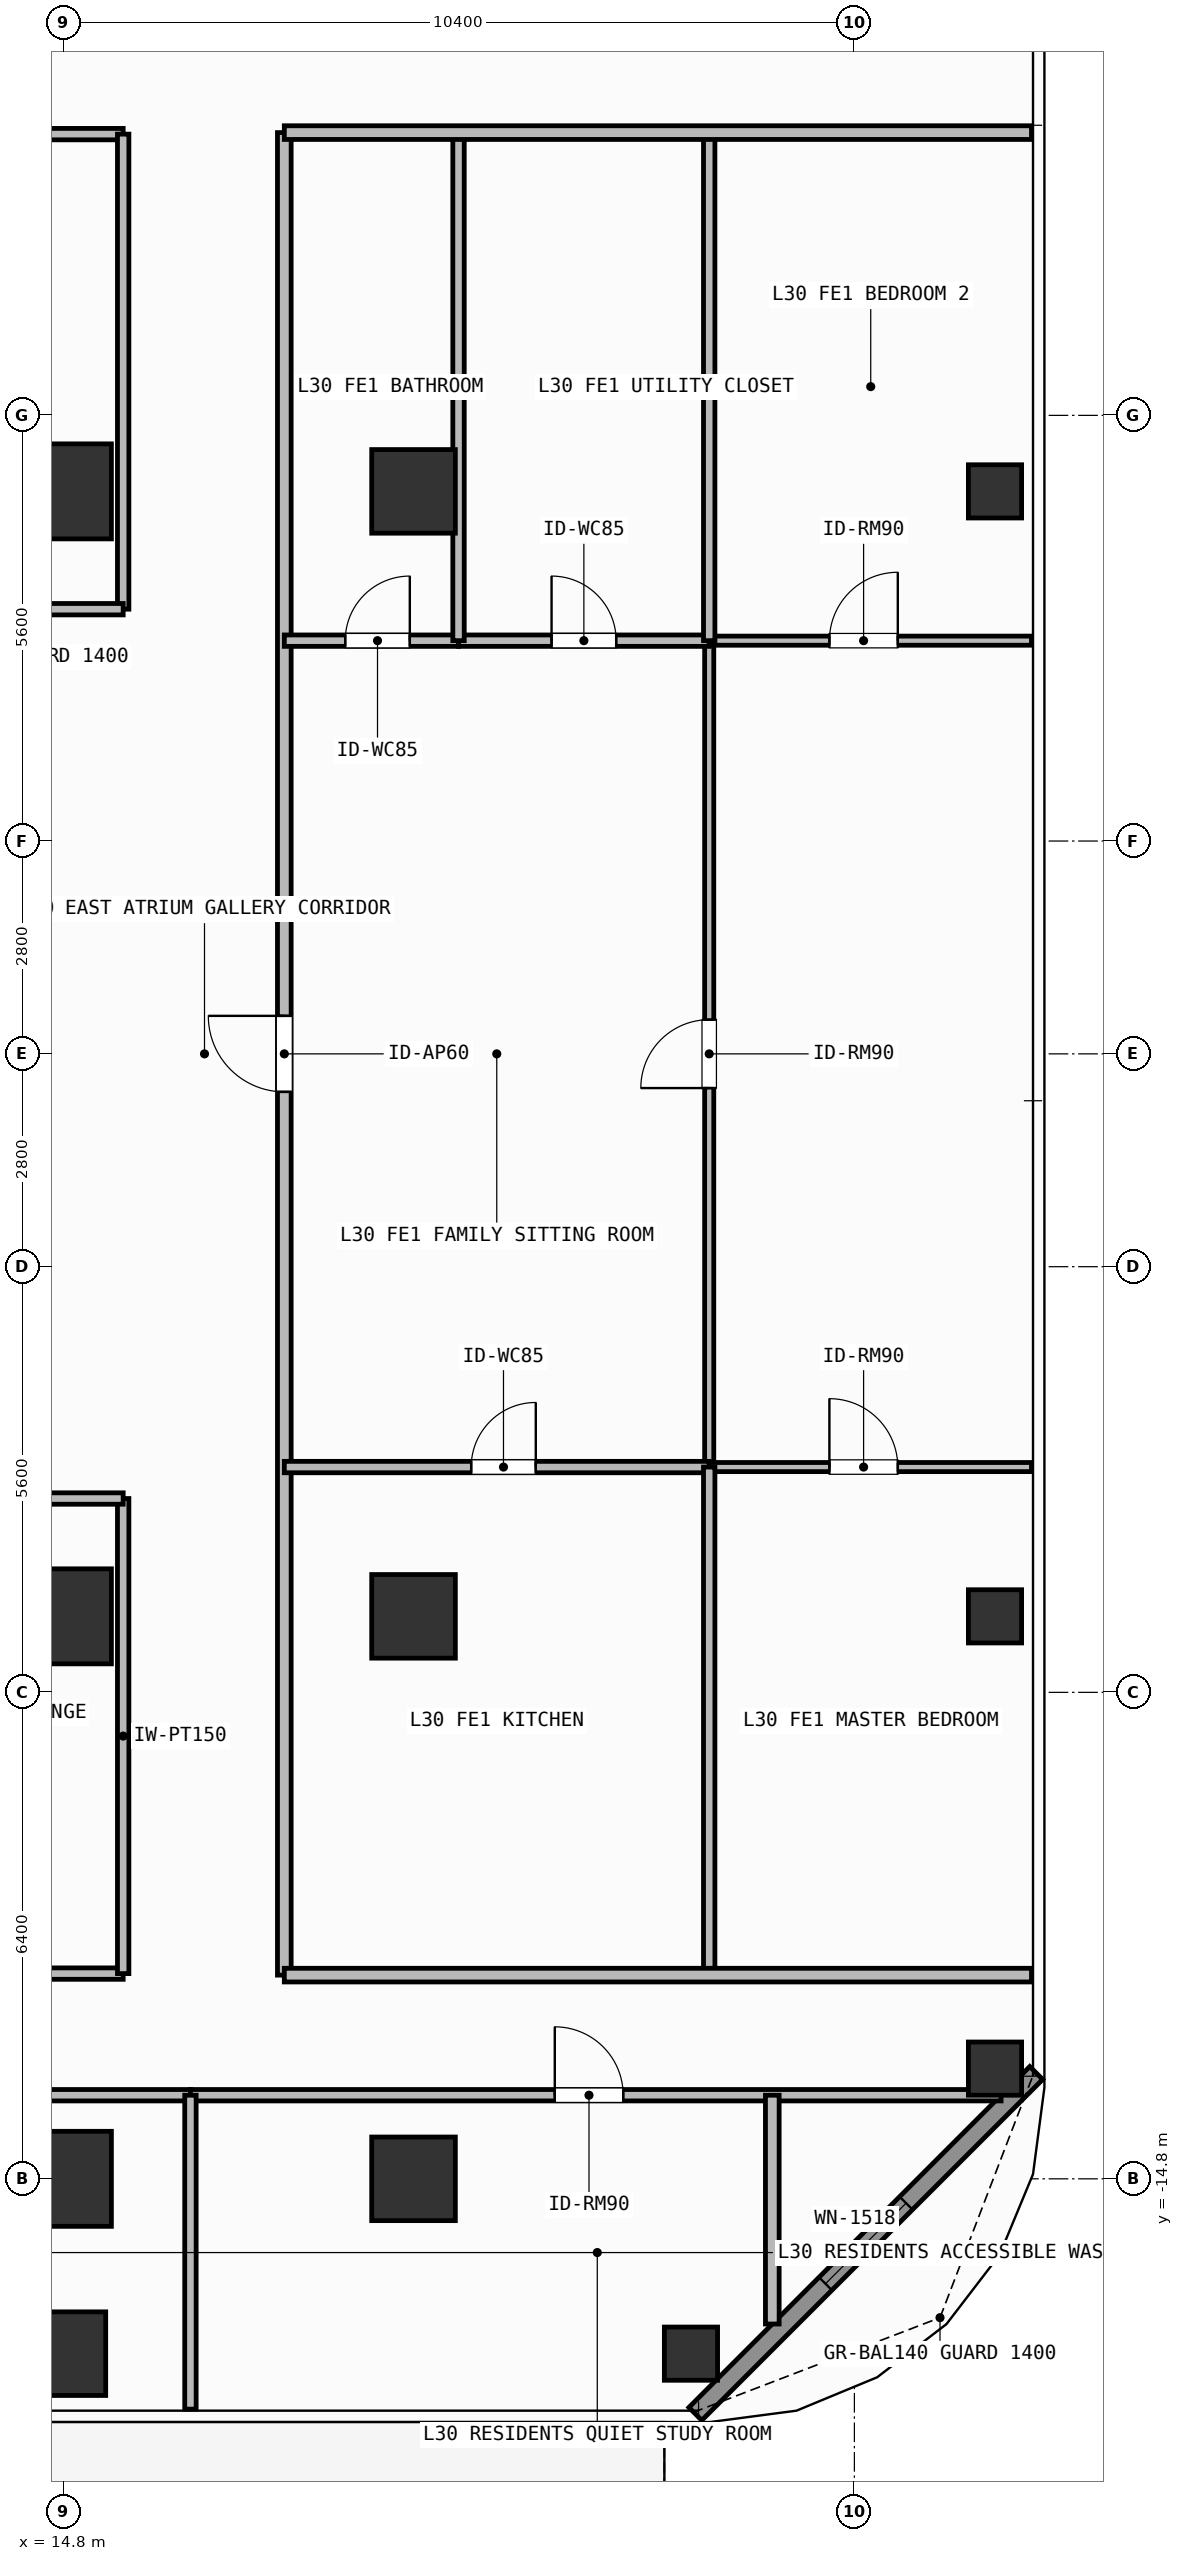
"""IFC4 building model, lengths in metres.
Left out: names, types, materials, properties, quantities, classifications, styles, units other than length and angle.
Written with IfcOpenShell. Run it as: python <this file> out.ifc"""

import sys

from ifc_helpers import new_model, si_unit, direction, frame, frame_2d, origin, origin_2d, place, context, subcontext, project, spatial, rectangle, hollow_rectangle, extrude, element, fill, save


model = new_model("IFC4")
c1 = context("Model", 3, precision=1e-05, world=origin(), true_north=direction((0.0, 1.0)))
c2 = subcontext(c1, "Body", "Model", "MODEL_VIEW")
j1 = project(units=[si_unit("LENGTHUNIT", "METRE"), si_unit("PLANEANGLEUNIT", "RADIAN")], contexts=[c1])
p1 = place(None, origin())
s1 = spatial("IfcSite", under=j1, at=p1, CompositionType="ELEMENT")
p2 = place(p1, origin())
s2 = spatial("IfcBuilding", under=s1, at=p2, CompositionType="ELEMENT")
p3 = place(p2, frame((0.0, 0.0, 121.2)))
s3 = spatial("IfcBuildingStorey", under=s2, at=p3, CompositionType="ELEMENT", Elevation=121.2)
for number, where, z_axis, x_axis in (
    (1, (14.8, -14.8, 0.0), (0.0, 0.0, 1.0), (1.0, 0.0, 0.0)),
    (2, (14.8, -7.4, 0.0), (0.0, 0.0, 1.0), (1.0, 0.0, 0.0)),
    (3, (14.8, 7.4, 0.0), (0.0, 0.0, 1.0), (1.0, 0.0, 0.0)),
):
    element("IfcColumn", number, at=place(p3, frame(where, z_axis=z_axis, x_axis=x_axis)), inside=s3, PredefinedType="COLUMN", context=c2, shape_type="SweptSolid", body=[
        extrude(rectangle(XDim=1.25, YDim=1.25, at=origin_2d()), origin(), (0.0, 0.0, 1.0), 3.9),
    ])
for number, where, z_axis, x_axis in (
    (4, (19.4, -14.8, 0.0), (0.0, 0.0, 1.0), (1.0, 0.0, 0.0)),
    (5, (19.4, -7.4, 0.0), (0.0, 0.0, 1.0), (1.0, 0.0, 0.0)),
    (6, (19.4, 7.4, 0.0), (0.0, 0.0, 1.0), (1.0, 0.0, 0.0)),
    (7, (14.8, -17.1, 0.0), (0.0, 0.0, 1.0), (1.0, 0.0, 0.0)),
):
    element("IfcColumn", number, at=place(p3, frame(where, z_axis=z_axis, x_axis=x_axis)), inside=s3, PredefinedType="COLUMN", context=c2, shape_type="SweptSolid", body=[
        extrude(rectangle(XDim=1.1, YDim=1.1, at=origin_2d()), origin(), (0.0, 0.0, 1.0), 3.9),
    ])
for number, where, z_axis, x_axis in (
    (8, (23.05, -17.1, 0.0), (0.0, 0.0, 1.0), (1.0, 0.0, 0.0)),
    (9, (27.05, -13.35, 0.0), (0.0, 0.0, 1.0), (1.0, 0.0, 0.0)),
    (10, (27.05, -7.4, 0.0), (0.0, 0.0, 1.0), (1.0, 0.0, 0.0)),
    (11, (27.05, 7.4, 0.0), (0.0, 0.0, 1.0), (1.0, 0.0, 0.0)),
):
    element("IfcColumn", number, at=place(p3, frame(where, z_axis=z_axis, x_axis=x_axis)), inside=s3, PredefinedType="COLUMN", context=c2, shape_type="SweptSolid", body=[
        extrude(hollow_rectangle(XDim=0.7, YDim=0.7, WallThickness=0.032, at=origin_2d()), origin(), (0.0, 0.0, 1.0), 3.9),
    ])
p4 = place(p3, frame((27.592, -13.408, 0.0), z_axis=(0.0, 0.0, 1.0), x_axis=(-0.707106781187, -0.707106781187, 0.0)))
e12 = element("IfcWall", 12, at=p4, inside=s3, PredefinedType="SOLIDWALL", context=c2, shape_type="SweptSolid", body=[
    extrude(rectangle(XDim=6.342, YDim=0.24, at=frame_2d((3.171, 0.0))), origin(), (0.0, 0.0, 1.0), 3.68),
])
p5 = place(p4, frame((2.421, 0.0, 0.8)))
e13 = element("IfcOpeningElement", 13, at=p5, cuts=e12, PredefinedType="OPENING", context=c2, shape_type="SweptSolid", body=[
    extrude(rectangle(XDim=1.5, YDim=1.85, at=frame_2d((0.75, 0.925))), frame((0.0, 0.13, 0.0), z_axis=(0.0, -1.0, 0.0), x_axis=(1.0, 0.0, 0.0)), (0.0, 0.0, 1.0), 0.26),
])
p6 = place(p3, frame((10.1, -12.1, 0.0), z_axis=(0.0, 0.0, 1.0), x_axis=(1.0, 0.0, 0.0)))
e14 = element("IfcWall", 14, at=p6, inside=s3, PredefinedType="PARTITIONING", context=c2, shape_type="SweptSolid", body=[
    extrude(rectangle(XDim=5.48, YDim=0.15, at=frame_2d((2.74, 0.0))), origin(), (0.0, 0.0, 1.0), 3.68),
])
p7 = place(p6, frame((2.29, 0.0, 0.0)))
e15 = element("IfcOpeningElement", 15, at=p7, cuts=e14, PredefinedType="OPENING", context=c2, shape_type="SweptSolid", body=[
    extrude(rectangle(XDim=0.9, YDim=2.1, at=frame_2d((0.45, 1.05))), frame((0.0, 0.085, 0.0), z_axis=(0.0, -1.0, 0.0), x_axis=(1.0, 0.0, 0.0)), (0.0, 0.0, 1.0), 0.17),
])
p8 = place(p3, frame((8.36, 12.1, 0.0), z_axis=(0.0, 0.0, 1.0), x_axis=(1.0, 0.0, 0.0)))
e16 = element("IfcWall", 16, at=p8, inside=s3, PredefinedType="PARTITIONING", context=c2, shape_type="SweptSolid", body=[
    extrude(rectangle(XDim=7.22, YDim=0.15, at=frame_2d((3.61, 0.0))), origin(), (0.0, 0.0, 1.0), 3.68),
])
p9 = place(p8, frame((3.513, 0.0, 0.0)))
e17 = element("IfcOpeningElement", 17, at=p9, cuts=e16, PredefinedType="OPENING", context=c2, shape_type="SweptSolid", body=[
    extrude(rectangle(XDim=0.9, YDim=2.1, at=frame_2d((0.45, 1.05))), frame((0.0, 0.085, 0.0), z_axis=(0.0, -1.0, 0.0), x_axis=(1.0, 0.0, 0.0)), (0.0, 0.0, 1.0), 0.17),
])
p10 = place(p3, frame((5.761, -13.7, 0.0), z_axis=(0.0, 0.0, 1.0), x_axis=(1.0, 0.0, 0.0)))
e18 = element("IfcWall", 18, at=p10, inside=s3, PredefinedType="PARTITIONING", context=c2, shape_type="SweptSolid", body=[
    extrude(rectangle(XDim=10.704, YDim=0.15, at=frame_2d((5.352, 0.0))), origin(), (0.0, 0.0, 1.0), 3.68),
])
p11 = place(p10, frame((4.812, 0.0, 0.0)))
e19 = element("IfcOpeningElement", 19, at=p11, cuts=e18, PredefinedType="OPENING", context=c2, shape_type="SweptSolid", body=[
    extrude(rectangle(XDim=0.9, YDim=2.1, at=frame_2d((0.45, 1.05))), frame((0.0, 0.085, 0.0), z_axis=(0.0, -1.0, 0.0), x_axis=(1.0, 0.0, 0.0)), (0.0, 0.0, 1.0), 0.17),
])
p12 = place(p3, frame((16.465, -13.7, 0.0), z_axis=(0.0, 0.0, 1.0), x_axis=(1.0, 0.0, 0.0)))
e20 = element("IfcWall", 20, at=p12, inside=s3, PredefinedType="PARTITIONING", context=c2, shape_type="SweptSolid", body=[
    extrude(rectangle(XDim=10.665, YDim=0.15, at=frame_2d((5.333, 0.0))), origin(), (0.0, 0.0, 1.0), 3.68),
])
p13 = place(p12, frame((4.793, 0.0, 0.0)))
e21 = element("IfcOpeningElement", 21, at=p13, cuts=e20, PredefinedType="OPENING", context=c2, shape_type="SweptSolid", body=[
    extrude(rectangle(XDim=0.9, YDim=2.1, at=frame_2d((0.45, 1.05))), frame((0.0, 0.085, 0.0), z_axis=(0.0, -1.0, 0.0), x_axis=(1.0, 0.0, 0.0)), (0.0, 0.0, 1.0), 0.17),
])
p14 = place(p3, frame((17.7, -12.12, 0.0), z_axis=(0.0, 0.0, 1.0), x_axis=(0.0, 1.0, 0.0)))
e22 = element("IfcWall", 22, at=p14, inside=s3, PredefinedType="PARTITIONING", context=c2, shape_type="SweptSolid", body=[
    extrude(rectangle(XDim=24.24, YDim=0.18, at=frame_2d((12.12, 0.0))), origin(), (0.0, 0.0, 1.0), 3.68),
])
p15 = place(p14, frame((11.62, 0.0, 0.0)))
e23 = element("IfcOpeningElement", 23, at=p15, cuts=e22, PredefinedType="OPENING", context=c2, shape_type="SweptSolid", body=[
    extrude(rectangle(XDim=1.0, YDim=2.2, at=frame_2d((0.5, 1.1))), frame((0.0, 0.1, 0.0), z_axis=(0.0, -1.0, 0.0), x_axis=(1.0, 0.0, 0.0)), (0.0, 0.0, 1.0), 0.2),
])
p16 = place(p3, frame((23.29, -5.436, 0.0), z_axis=(0.0, 0.0, 1.0), x_axis=(0.0, 1.0, 0.0)))
e24 = element("IfcWall", 24, at=p16, inside=s3, PredefinedType="PARTITIONING", context=c2, shape_type="SweptSolid", body=[
    extrude(rectangle(XDim=10.872, YDim=0.12, at=frame_2d((5.436, 0.0))), origin(), (0.0, 0.0, 1.0), 3.68),
])
p17 = place(p16, frame((4.986, 0.0, 0.0)))
e25 = element("IfcOpeningElement", 25, at=p17, cuts=e24, PredefinedType="OPENING", context=c2, shape_type="SweptSolid", body=[
    extrude(rectangle(XDim=0.9, YDim=2.1, at=frame_2d((0.45, 1.05))), frame((0.0, 0.07, 0.0), z_axis=(0.0, -1.0, 0.0), x_axis=(1.0, 0.0, 0.0)), (0.0, 0.0, 1.0), 0.14),
])
p18 = place(p3, frame((17.7, 5.436, 0.0), z_axis=(0.0, 0.0, 1.0), x_axis=(1.0, 0.0, 0.0)))
e26 = element("IfcWall", 26, at=p18, inside=s3, PredefinedType="PARTITIONING", context=c2, shape_type="SweptSolid", body=[
    extrude(rectangle(XDim=2.292, YDim=0.15, at=frame_2d((1.146, 0.0))), origin(), (0.0, 0.0, 1.0), 3.68),
])
p19 = place(p18, frame((0.801, 0.0, 0.0)))
e27 = element("IfcOpeningElement", 27, at=p19, cuts=e26, PredefinedType="OPENING", context=c2, shape_type="SweptSolid", body=[
    extrude(rectangle(XDim=0.85, YDim=2.1, at=frame_2d((0.425, 1.05))), frame((0.0, 0.085, 0.0), z_axis=(0.0, -1.0, 0.0), x_axis=(1.0, 0.0, 0.0)), (0.0, 0.0, 1.0), 0.17),
])
p20 = place(p3, frame((19.992, 5.436, 0.0), z_axis=(0.0, 0.0, 1.0), x_axis=(1.0, 0.0, 0.0)))
e28 = element("IfcWall", 28, at=p20, inside=s3, PredefinedType="PARTITIONING", context=c2, shape_type="SweptSolid", body=[
    extrude(rectangle(XDim=3.298, YDim=0.15, at=frame_2d((1.649, 0.0))), origin(), (0.0, 0.0, 1.0), 3.68),
])
p21 = place(p20, frame((1.224, 0.0, 0.0)))
e29 = element("IfcOpeningElement", 29, at=p21, cuts=e28, PredefinedType="OPENING", context=c2, shape_type="SweptSolid", body=[
    extrude(rectangle(XDim=0.85, YDim=2.1, at=frame_2d((0.425, 1.05))), frame((0.0, 0.085, 0.0), z_axis=(0.0, -1.0, 0.0), x_axis=(1.0, 0.0, 0.0)), (0.0, 0.0, 1.0), 0.17),
])
p22 = place(p3, frame((17.7, -5.436, 0.0), z_axis=(0.0, 0.0, 1.0), x_axis=(1.0, 0.0, 0.0)))
e30 = element("IfcWall", 30, at=p22, inside=s3, PredefinedType="PARTITIONING", context=c2, shape_type="SweptSolid", body=[
    extrude(rectangle(XDim=5.59, YDim=0.15, at=frame_2d((2.795, 0.0))), origin(), (0.0, 0.0, 1.0), 3.68),
])
p23 = place(p22, frame((2.458, 0.0, 0.0)))
e31 = element("IfcOpeningElement", 31, at=p23, cuts=e30, PredefinedType="OPENING", context=c2, shape_type="SweptSolid", body=[
    extrude(rectangle(XDim=0.85, YDim=2.1, at=frame_2d((0.425, 1.05))), frame((0.0, 0.085, 0.0), z_axis=(0.0, -1.0, 0.0), x_axis=(1.0, 0.0, 0.0)), (0.0, 0.0, 1.0), 0.17),
])
p24 = place(p3, frame((23.29, -5.436, 0.0), z_axis=(0.0, 0.0, 1.0), x_axis=(1.0, 0.0, 0.0)))
e32 = element("IfcWall", 32, at=p24, inside=s3, PredefinedType="PARTITIONING", context=c2, shape_type="SweptSolid", body=[
    extrude(rectangle(XDim=4.24, YDim=0.12, at=frame_2d((2.12, 0.0))), origin(), (0.0, 0.0, 1.0), 3.68),
])
p25 = place(p24, frame((1.581, 0.0, 0.0)))
e33 = element("IfcOpeningElement", 33, at=p25, cuts=e32, PredefinedType="OPENING", context=c2, shape_type="SweptSolid", body=[
    extrude(rectangle(XDim=0.9, YDim=2.1, at=frame_2d((0.45, 1.05))), frame((0.0, 0.07, 0.0), z_axis=(0.0, -1.0, 0.0), x_axis=(1.0, 0.0, 0.0)), (0.0, 0.0, 1.0), 0.14),
])
p26 = place(p3, frame((23.29, 5.436, 0.0), z_axis=(0.0, 0.0, 1.0), x_axis=(1.0, 0.0, 0.0)))
e34 = element("IfcWall", 34, at=p26, inside=s3, PredefinedType="PARTITIONING", context=c2, shape_type="SweptSolid", body=[
    extrude(rectangle(XDim=4.24, YDim=0.12, at=frame_2d((2.12, 0.0))), origin(), (0.0, 0.0, 1.0), 3.68),
])
p27 = place(p26, frame((1.581, 0.0, 0.0)))
e35 = element("IfcOpeningElement", 35, at=p27, cuts=e34, PredefinedType="OPENING", context=c2, shape_type="SweptSolid", body=[
    extrude(rectangle(XDim=0.9, YDim=2.1, at=frame_2d((0.45, 1.05))), frame((0.0, 0.07, 0.0), z_axis=(0.0, -1.0, 0.0), x_axis=(1.0, 0.0, 0.0)), (0.0, 0.0, 1.0), 0.14),
])
p28 = place(p3, frame((15.58, -12.1, 0.0), z_axis=(0.0, 0.0, 1.0), x_axis=(0.0, 1.0, 0.0)))
e36 = element("IfcWall", 36, at=p28, inside=s3, PredefinedType="PARTITIONING", context=c2, shape_type="SweptSolid", body=[
    extrude(rectangle(XDim=6.25, YDim=0.15, at=frame_2d((3.125, 0.0))), origin(), (0.0, 0.0, 1.0), 3.68),
])
p29 = place(p3, frame((8.96, -5.85, 0.0), z_axis=(0.0, 0.0, 1.0), x_axis=(1.0, 0.0, 0.0)))
e37 = element("IfcWall", 37, at=p29, inside=s3, PredefinedType="PARTITIONING", context=c2, shape_type="SweptSolid", body=[
    extrude(rectangle(XDim=6.62, YDim=0.15, at=frame_2d((3.31, 0.0))), origin(), (0.0, 0.0, 1.0), 3.68),
])
p30 = place(p3, frame((15.58, 5.85, 0.0), z_axis=(0.0, 0.0, 1.0), x_axis=(0.0, 1.0, 0.0)))
e38 = element("IfcWall", 38, at=p30, inside=s3, PredefinedType="PARTITIONING", context=c2, shape_type="SweptSolid", body=[
    extrude(rectangle(XDim=6.25, YDim=0.15, at=frame_2d((3.125, 0.0))), origin(), (0.0, 0.0, 1.0), 3.68),
])
p31 = place(p3, frame((8.96, 5.85, 0.0), z_axis=(0.0, 0.0, 1.0), x_axis=(1.0, 0.0, 0.0)))
e39 = element("IfcWall", 39, at=p31, inside=s3, PredefinedType="PARTITIONING", context=c2, shape_type="SweptSolid", body=[
    extrude(rectangle(XDim=6.62, YDim=0.15, at=frame_2d((3.31, 0.0))), origin(), (0.0, 0.0, 1.0), 3.68),
])
p32 = place(p3, frame((24.12, -16.71, 0.0), z_axis=(0.0, 0.0, 1.0), x_axis=(0.0, 1.0, 0.0)))
e40 = element("IfcWall", 40, at=p32, inside=s3, PredefinedType="PARTITIONING", context=c2, shape_type="SweptSolid", body=[
    extrude(rectangle(XDim=3.01, YDim=0.18, at=frame_2d((1.505, 0.0))), origin(), (0.0, 0.0, 1.0), 3.68),
])
p33 = place(p3, frame((16.465, -17.83, 0.0), z_axis=(0.0, 0.0, 1.0), x_axis=(0.0, 1.0, 0.0)))
e41 = element("IfcWall", 41, at=p33, inside=s3, PredefinedType="PARTITIONING", context=c2, shape_type="SweptSolid", body=[
    extrude(rectangle(XDim=4.13, YDim=0.15, at=frame_2d((2.065, 0.0))), origin(), (0.0, 0.0, 1.0), 3.68),
])
for number, where, z_axis, x_axis in (
    (42, (19.992, 5.436, 0.0), (0.0, 0.0, 1.0), (0.0, 1.0, 0.0)),
    (43, (23.29, -12.12, 0.0), (0.0, 0.0, 1.0), (0.0, 1.0, 0.0)),
    (44, (23.29, 5.436, 0.0), (0.0, 0.0, 1.0), (0.0, 1.0, 0.0)),
):
    element("IfcWall", number, at=place(p3, frame(where, z_axis=z_axis, x_axis=x_axis)), inside=s3, PredefinedType="PARTITIONING", context=c2, shape_type="SweptSolid", body=[
        extrude(rectangle(XDim=6.684, YDim=0.15, at=frame_2d((3.342, 0.0))), origin(), (0.0, 0.0, 1.0), 3.68),
    ])
for number, where, z_axis, x_axis in (
    (45, (17.7, -12.12, 0.0), (0.0, 0.0, 1.0), (1.0, 0.0, 0.0)),
    (46, (17.7, 12.12, 0.0), (0.0, 0.0, 1.0), (1.0, 0.0, 0.0)),
):
    element("IfcWall", number, at=place(p3, frame(where, z_axis=z_axis, x_axis=x_axis)), inside=s3, PredefinedType="PARTITIONING", context=c2, shape_type="SweptSolid", body=[
        extrude(rectangle(XDim=9.83, YDim=0.18, at=frame_2d((4.915, 0.0))), origin(), (0.0, 0.0, 1.0), 3.68),
    ])
p34 = place(p5, origin())
e47 = element("IfcWindow", 47, at=p34, inside=s3, PartitioningType="SINGLE_PANEL", PredefinedType="WINDOW", context=c2, shape_type="SweptSolid", body=[
    extrude(rectangle(XDim=1.5, YDim=1.85, at=frame_2d((0.75, 0.925))), frame((0.0, 0.03, 0.0), z_axis=(0.0, -1.0, 0.0), x_axis=(1.0, 0.0, 0.0)), (0.0, 0.0, 1.0), 0.06),
])
fill(e13, e47)
p35 = place(p13, origin())
e48 = element("IfcDoor", 48, at=p35, inside=s3, OperationType="SINGLE_SWING_LEFT", PredefinedType="DOOR", context=c2, shape_type="SweptSolid", body=[
    extrude(rectangle(XDim=0.9, YDim=2.1, at=frame_2d((0.45, 1.05))), frame((0.0, 0.025, 0.0), z_axis=(0.0, -1.0, 0.0), x_axis=(1.0, 0.0, 0.0)), (0.0, 0.0, 1.0), 0.05),
])
fill(e21, e48)
p36 = place(p15, origin())
e49 = element("IfcDoor", 49, at=p36, inside=s3, OperationType="SINGLE_SWING_RIGHT", PredefinedType="DOOR", context=c2, shape_type="SweptSolid", body=[
    extrude(rectangle(XDim=1.0, YDim=2.2, at=frame_2d((0.5, 1.1))), frame((0.0, 0.025, 0.0), z_axis=(0.0, -1.0, 0.0), x_axis=(1.0, 0.0, 0.0)), (0.0, 0.0, 1.0), 0.05),
])
fill(e23, e49)
p37 = place(p17, origin())
e50 = element("IfcDoor", 50, at=p37, inside=s3, OperationType="SINGLE_SWING_LEFT", PredefinedType="DOOR", context=c2, shape_type="SweptSolid", body=[
    extrude(rectangle(XDim=0.9, YDim=2.1, at=frame_2d((0.45, 1.05))), frame((0.0, 0.025, 0.0), z_axis=(0.0, -1.0, 0.0), x_axis=(1.0, 0.0, 0.0)), (0.0, 0.0, 1.0), 0.05),
])
fill(e25, e50)
p38 = place(p19, origin())
e51 = element("IfcDoor", 51, at=p38, inside=s3, OperationType="SINGLE_SWING_RIGHT", PredefinedType="DOOR", context=c2, shape_type="SweptSolid", body=[
    extrude(rectangle(XDim=0.85, YDim=2.1, at=frame_2d((0.425, 1.05))), frame((0.0, 0.025, 0.0), z_axis=(0.0, -1.0, 0.0), x_axis=(1.0, 0.0, 0.0)), (0.0, 0.0, 1.0), 0.05),
])
fill(e27, e51)
p39 = place(p21, origin())
e52 = element("IfcDoor", 52, at=p39, inside=s3, OperationType="SINGLE_SWING_LEFT", PredefinedType="DOOR", context=c2, shape_type="SweptSolid", body=[
    extrude(rectangle(XDim=0.85, YDim=2.1, at=frame_2d((0.425, 1.05))), frame((0.0, 0.025, 0.0), z_axis=(0.0, -1.0, 0.0), x_axis=(1.0, 0.0, 0.0)), (0.0, 0.0, 1.0), 0.05),
])
fill(e29, e52)
p40 = place(p23, origin())
e53 = element("IfcDoor", 53, at=p40, inside=s3, OperationType="SINGLE_SWING_RIGHT", PredefinedType="DOOR", context=c2, shape_type="SweptSolid", body=[
    extrude(rectangle(XDim=0.85, YDim=2.1, at=frame_2d((0.425, 1.05))), frame((0.0, 0.025, 0.0), z_axis=(0.0, -1.0, 0.0), x_axis=(1.0, 0.0, 0.0)), (0.0, 0.0, 1.0), 0.05),
])
fill(e31, e53)
p41 = place(p25, origin())
e54 = element("IfcDoor", 54, at=p41, inside=s3, OperationType="SINGLE_SWING_LEFT", PredefinedType="DOOR", context=c2, shape_type="SweptSolid", body=[
    extrude(rectangle(XDim=0.9, YDim=2.1, at=frame_2d((0.45, 1.05))), frame((0.0, 0.025, 0.0), z_axis=(0.0, -1.0, 0.0), x_axis=(1.0, 0.0, 0.0)), (0.0, 0.0, 1.0), 0.05),
])
fill(e33, e54)
p42 = place(p27, origin())
e55 = element("IfcDoor", 55, at=p42, inside=s3, OperationType="SINGLE_SWING_RIGHT", PredefinedType="DOOR", context=c2, shape_type="SweptSolid", body=[
    extrude(rectangle(XDim=0.9, YDim=2.1, at=frame_2d((0.45, 1.05))), frame((0.0, 0.025, 0.0), z_axis=(0.0, -1.0, 0.0), x_axis=(1.0, 0.0, 0.0)), (0.0, 0.0, 1.0), 0.05),
])
fill(e35, e55)
save(model, sys.argv[1])
